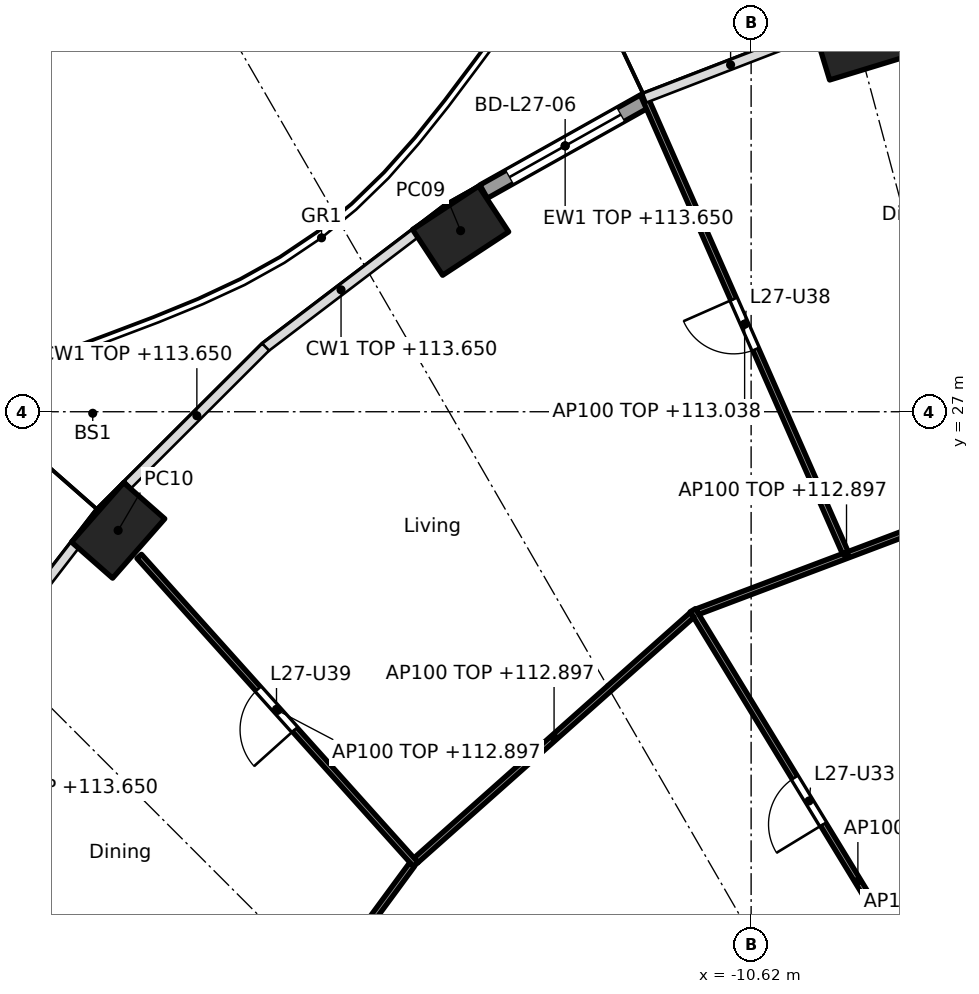
"""IFC4 building model, lengths in metres.
Left out: names, types, materials, properties, quantities, classifications, styles, units other than length and angle.
Written with IfcOpenShell. Run it as: python <this file> out.ifc"""

import sys

from ifc_helpers import new_model, si_unit, direction, frame, frame_2d, origin, origin_2d, place, context, subcontext, project, spatial, rectangle, hollow_rectangle, extrude, element, fill, save


model = new_model("IFC4")
c1 = context("Model", 3, precision=1e-05, world=origin(), true_north=direction((0.0, 1.0)))
c2 = subcontext(c1, "Body", "Model", "MODEL_VIEW")
j1 = project(units=[si_unit("LENGTHUNIT", "METRE"), si_unit("PLANEANGLEUNIT", "RADIAN")], contexts=[c1])
p1 = place(None, origin())
s1 = spatial("IfcSite", under=j1, at=p1, CompositionType="ELEMENT")
p2 = place(p1, origin())
s2 = spatial("IfcBuilding", under=s1, at=p2, CompositionType="ELEMENT")
p3 = place(p2, frame((0.0, 0.0, 110.3)))
s3 = spatial("IfcBuildingStorey", under=s2, at=p3, CompositionType="ELEMENT", Elevation=110.3)
for number, where, z_axis, x_axis in (
    (1, (-8.839, 33.076, 0.0), (0.0, 0.0, 1.0), (-0.957, -0.292, 0.0)),
    (2, (-15.397, 29.978, 0.0), (0.0, 0.0, 1.0), (-0.836, -0.549, 0.0)),
    (3, (-21.03, 25.049, 0.0), (0.0, 0.0, 1.0), (-0.66, -0.751, 0.0)),
):
    element("IfcColumn", number, at=place(p3, frame(where, z_axis=z_axis, x_axis=x_axis)), inside=s3, PredefinedType="COLUMN", context=c2, shape_type="SweptSolid", body=[
        extrude(hollow_rectangle(XDim=1.3, YDim=0.9, WallThickness=0.045, at=origin_2d()), origin(), (0.0, 0.0, 1.0), 3.7),
    ])
p4 = place(p3, frame((-15.02, 30.62, 0.0), z_axis=(0.0, 0.0, 1.0), x_axis=(0.872090167423, 0.489345215451, 0.0)))
e4 = element("IfcWall", 4, at=p4, inside=s3, PredefinedType="SOLIDWALL", context=c2, shape_type="SweptSolid", body=[
    extrude(rectangle(XDim=3.076, YDim=0.25, at=frame_2d((1.538, 0.0))), origin(), (0.0, 0.0, 1.0), 3.35),
])
p5 = place(p4, frame((0.488, 0.0, 0.0)))
e5 = element("IfcOpeningElement", 5, at=p5, cuts=e4, PredefinedType="OPENING", context=c2, shape_type="SweptSolid", body=[
    extrude(rectangle(XDim=2.1, YDim=2.4, at=frame_2d((1.05, 1.2))), frame((0.0, 0.135, 0.0), z_axis=(0.0, -1.0, 0.0), x_axis=(1.0, 0.0, 0.0)), (0.0, 0.0, 1.0), 0.27),
])
p6 = place(p3, frame((-6.596, 25.563, 0.0), z_axis=(0.0, 0.0, 1.0), x_axis=(-0.9356162121, -0.353018843201, 0.0)))
e6 = element("IfcWall", 6, at=p6, inside=s3, PredefinedType="PARTITIONING", context=c2, shape_type="SweptSolid", body=[
    extrude(rectangle(XDim=5.249, YDim=0.1, at=frame_2d((2.625, 0.0))), origin(), (0.0, 0.0, 1.0), 2.597),
])
p7 = place(p3, frame((-9.072, 24.683, 0.0), z_axis=(0.0, 0.0, 1.0), x_axis=(-0.403192911159, 0.915115007194, 0.0)))
e7 = element("IfcWall", 7, at=p7, inside=s3, PredefinedType="PARTITIONING", context=c2, shape_type="SweptSolid", body=[
    extrude(rectangle(XDim=8.211, YDim=0.1, at=frame_2d((4.106, 0.0))), origin(), (0.0, 0.0, 1.0), 2.738),
])
p8 = place(p7, frame((3.656, 0.0, 0.0)))
e8 = element("IfcOpeningElement", 8, at=p8, cuts=e7, PredefinedType="OPENING", context=c2, shape_type="SweptSolid", body=[
    extrude(rectangle(XDim=0.9, YDim=2.1, at=frame_2d((0.45, 1.05))), frame((0.0, 0.06, 0.0), z_axis=(0.0, -1.0, 0.0), x_axis=(1.0, 0.0, 0.0)), (0.0, 0.0, 1.0), 0.12),
])
p9 = place(p3, frame((-6.149, 14.825, 0.0), z_axis=(0.0, 0.0, 1.0), x_axis=(-0.520411490252, 0.853915616917, 0.0)))
e9 = element("IfcWall", 9, at=p9, inside=s3, PredefinedType="PARTITIONING", context=c2, shape_type="SweptSolid", body=[
    extrude(rectangle(XDim=10.435, YDim=0.1, at=frame_2d((5.218, 0.0))), origin(), (0.0, 0.0, 1.0), 3.35),
])
p10 = place(p9, frame((1.582, 0.0, 0.0)))
e10 = element("IfcOpeningElement", 10, at=p10, cuts=e9, PredefinedType="OPENING", context=c2, shape_type="SweptSolid", body=[
    extrude(rectangle(XDim=0.9, YDim=2.1, at=frame_2d((0.45, 1.05))), frame((0.0, 0.06, 0.0), z_axis=(0.0, -1.0, 0.0), x_axis=(1.0, 0.0, 0.0)), (0.0, 0.0, 1.0), 0.12),
])
p11 = place(p9, frame((6.312, 0.0, 0.0)))
e11 = element("IfcOpeningElement", 11, at=p11, cuts=e9, PredefinedType="OPENING", context=c2, shape_type="SweptSolid", body=[
    extrude(rectangle(XDim=0.9, YDim=2.1, at=frame_2d((0.45, 1.05))), frame((0.0, 0.06, 0.0), z_axis=(0.0, -1.0, 0.0), x_axis=(1.0, 0.0, 0.0)), (0.0, 0.0, 1.0), 0.12),
])
p12 = place(p3, frame((-11.591, 23.66, 0.0), z_axis=(0.0, 0.0, 1.0), x_axis=(-0.747429278403, -0.664341383466, 0.0)))
e12 = element("IfcWall", 12, at=p12, inside=s3, PredefinedType="PARTITIONING", context=c2, shape_type="SweptSolid", body=[
    extrude(rectangle(XDim=6.073, YDim=0.1, at=frame_2d((3.037, 0.0))), origin(), (0.0, 0.0, 1.0), 2.597),
])
p13 = place(p3, frame((-16.134, 19.554, 0.0), z_axis=(0.0, 0.0, 1.0), x_axis=(-0.667985610263, 0.74417418961, 0.0)))
e13 = element("IfcWall", 13, at=p13, inside=s3, PredefinedType="PARTITIONING", context=c2, shape_type="SweptSolid", body=[
    extrude(rectangle(XDim=6.809, YDim=0.1, at=frame_2d((3.405, 0.0))), origin(), (0.0, 0.0, 1.0), 2.597),
])
p14 = place(p13, frame((2.98, 0.0, 0.0)))
e14 = element("IfcOpeningElement", 14, at=p14, cuts=e13, PredefinedType="OPENING", context=c2, shape_type="SweptSolid", body=[
    extrude(rectangle(XDim=0.9, YDim=2.1, at=frame_2d((0.45, 1.05))), frame((0.0, 0.06, 0.0), z_axis=(0.0, -1.0, 0.0), x_axis=(1.0, 0.0, 0.0)), (0.0, 0.0, 1.0), 0.12),
])
p15 = place(p3, frame((-16.197, 19.551, 0.0), z_axis=(0.0, 0.0, 1.0), x_axis=(-0.592391983588, -0.80564988536, 0.0)))
e15 = element("IfcWall", 15, at=p15, inside=s3, PredefinedType="PARTITIONING", context=c2, shape_type="SweptSolid", body=[
    extrude(rectangle(XDim=6.08, YDim=0.1, at=frame_2d((3.04, 0.0))), origin(), (0.0, 0.0, 1.0), 2.597),
])
p16 = place(p5, origin())
e16 = element("IfcDoor", 16, at=p16, inside=s3, OperationType="SLIDING_TO_LEFT", PredefinedType="DOOR", context=c2, shape_type="SweptSolid", body=[
    extrude(rectangle(XDim=2.1, YDim=2.4, at=frame_2d((1.05, 1.2))), frame((0.0, 0.025, 0.0), z_axis=(0.0, -1.0, 0.0), x_axis=(1.0, 0.0, 0.0)), (0.0, 0.0, 1.0), 0.05),
])
fill(e5, e16)
p17 = place(p11, origin())
e17 = element("IfcDoor", 17, at=p17, inside=s3, OperationType="SINGLE_SWING_LEFT", PredefinedType="DOOR", context=c2, shape_type="SweptSolid", body=[
    extrude(rectangle(XDim=0.9, YDim=2.1, at=frame_2d((0.45, 1.05))), frame((0.0, 0.025, 0.0), z_axis=(0.0, -1.0, 0.0), x_axis=(1.0, 0.0, 0.0)), (0.0, 0.0, 1.0), 0.05),
])
fill(e11, e17)
p18 = place(p8, origin())
e18 = element("IfcDoor", 18, at=p18, inside=s3, OperationType="SINGLE_SWING_RIGHT", PredefinedType="DOOR", context=c2, shape_type="SweptSolid", body=[
    extrude(rectangle(XDim=0.9, YDim=2.1, at=frame_2d((0.45, 1.05))), frame((0.0, 0.025, 0.0), z_axis=(0.0, -1.0, 0.0), x_axis=(1.0, 0.0, 0.0)), (0.0, 0.0, 1.0), 0.05),
])
fill(e8, e18)
p19 = place(p14, origin())
e19 = element("IfcDoor", 19, at=p19, inside=s3, OperationType="SINGLE_SWING_LEFT", PredefinedType="DOOR", context=c2, shape_type="SweptSolid", body=[
    extrude(rectangle(XDim=0.9, YDim=2.1, at=frame_2d((0.45, 1.05))), frame((0.0, 0.025, 0.0), z_axis=(0.0, -1.0, 0.0), x_axis=(1.0, 0.0, 0.0)), (0.0, 0.0, 1.0), 0.05),
])
fill(e14, e19)
save(model, sys.argv[1])
